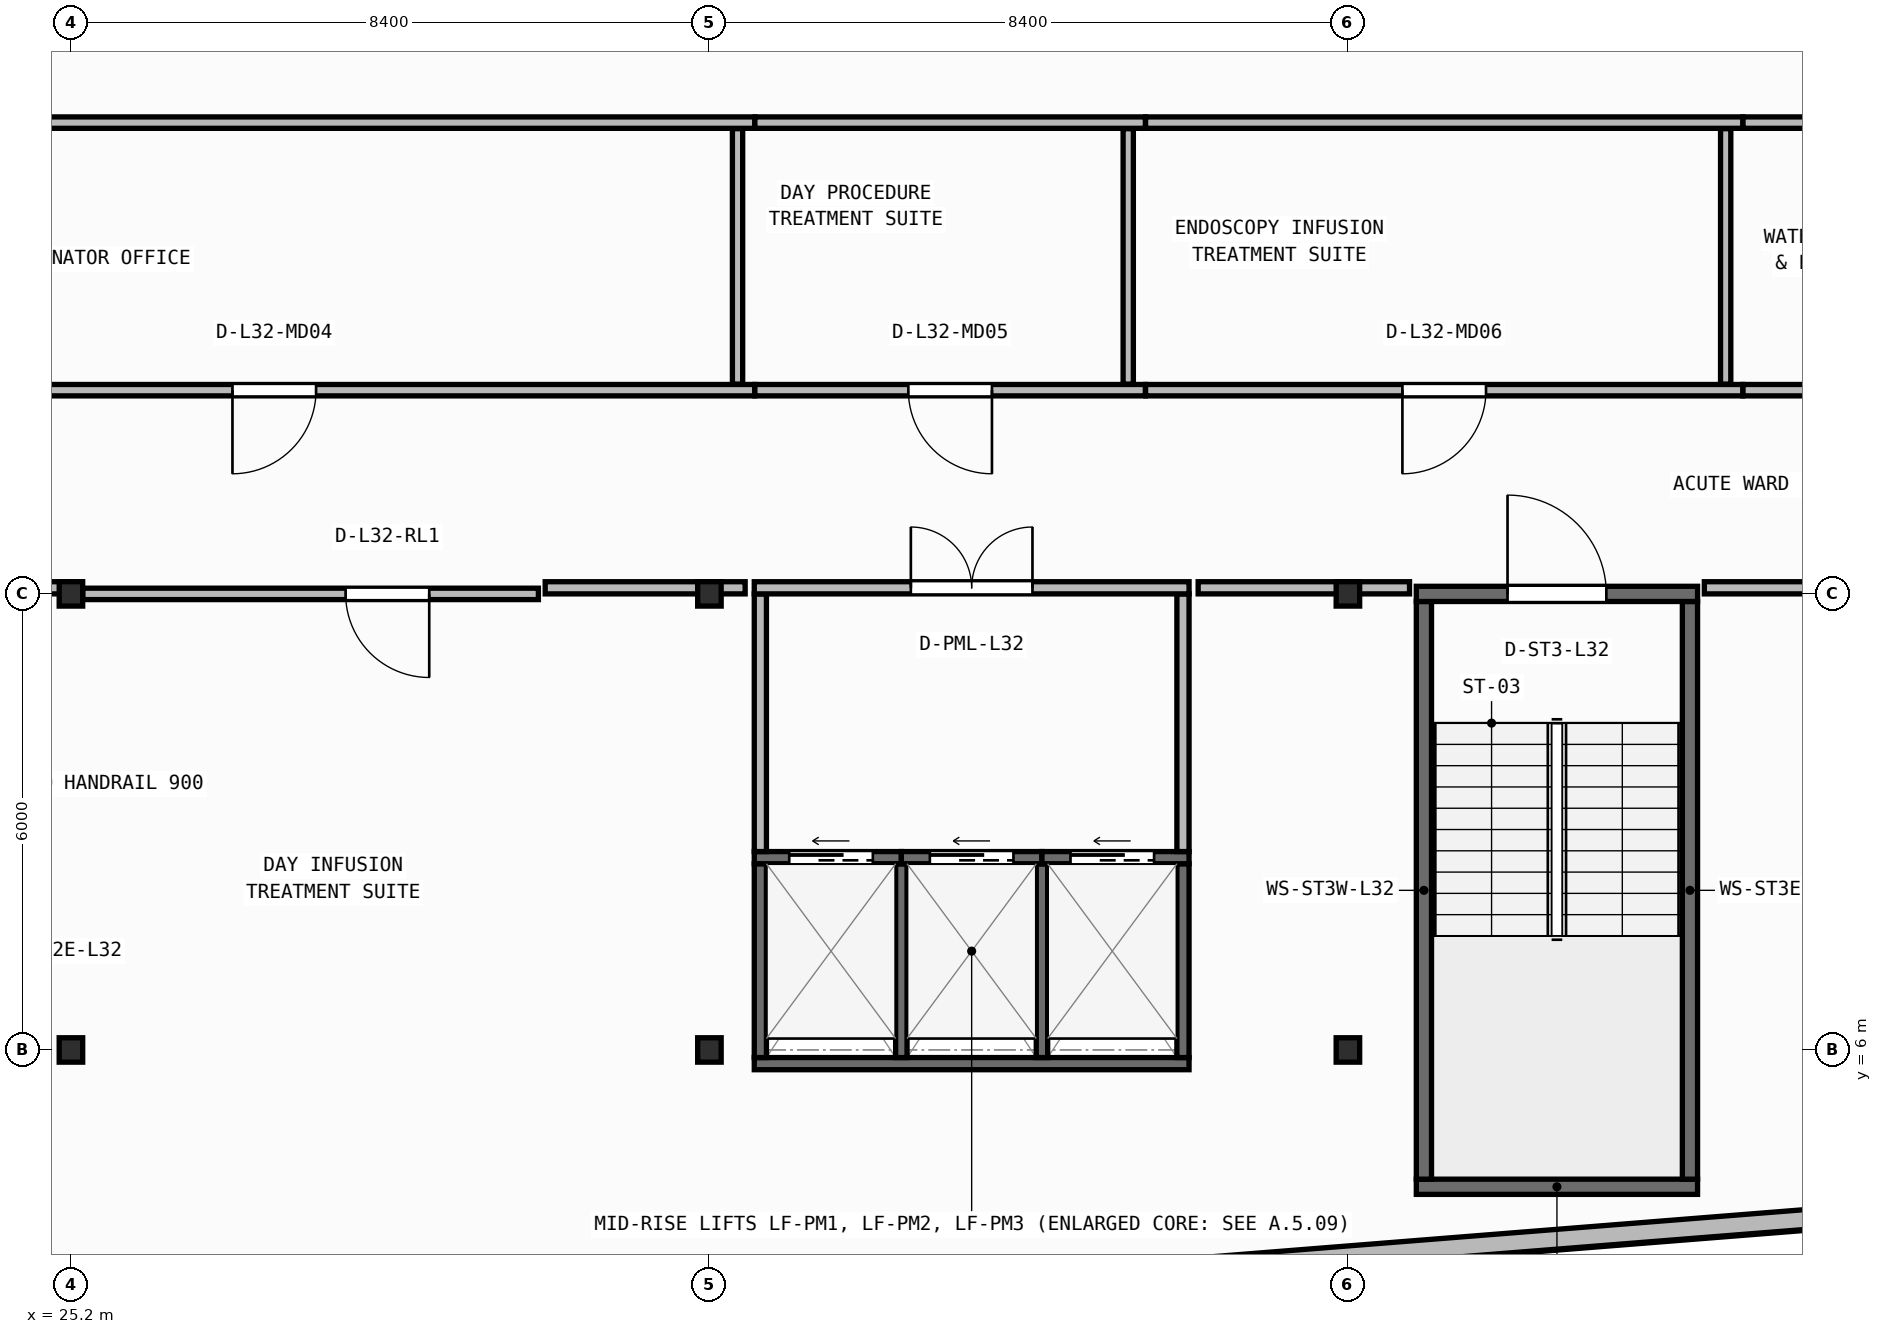
"""IFC4 building model, lengths in metres.
Left out: names, types, materials, properties, quantities, classifications, styles, units other than length and angle.
Written with IfcOpenShell. Run it as: python <this file> out.ifc"""

import sys

from ifc_helpers import new_model, si_unit, direction, frame, frame_2d, origin, origin_2d, place, context, subcontext, project, spatial, rectangle, i_section, extrude, element, fill, save


model = new_model("IFC4")
c1 = context("Model", 3, precision=1e-05, world=origin(), true_north=direction((0.0, 1.0)))
c2 = subcontext(c1, "Body", "Model", "MODEL_VIEW")
j1 = project(units=[si_unit("LENGTHUNIT", "METRE"), si_unit("PLANEANGLEUNIT", "RADIAN")], contexts=[c1])
p1 = place(None, origin())
s1 = spatial("IfcSite", under=j1, at=p1, CompositionType="ELEMENT")
p2 = place(p1, origin())
s2 = spatial("IfcBuilding", under=s1, at=p2, CompositionType="ELEMENT")
p3 = place(p2, frame((0.0, 0.0, 131.0)))
s3 = spatial("IfcBuildingStorey", under=s2, at=p3, CompositionType="ELEMENT", Elevation=131.0)
for number, where, z_axis, x_axis in (
    (1, (25.2, 6.0, 0.0), (0.0, 0.0, 1.0), (1.0, 0.0, 0.0)),
    (2, (33.6, 6.0, 0.0), (0.0, 0.0, 1.0), (1.0, 0.0, 0.0)),
    (3, (42.0, 6.0, 0.0), (0.0, 0.0, 1.0), (1.0, 0.0, 0.0)),
    (4, (25.2, 12.0, 0.0), (0.0, 0.0, 1.0), (1.0, 0.0, 0.0)),
    (5, (33.6, 12.0, 0.0), (0.0, 0.0, 1.0), (1.0, 0.0, 0.0)),
    (6, (42.0, 12.0, 0.0), (0.0, 0.0, 1.0), (1.0, 0.0, 0.0)),
):
    element("IfcColumn", number, at=place(p3, frame(where, z_axis=z_axis, x_axis=x_axis)), inside=s3, PredefinedType="COLUMN", context=c2, shape_type="SweptSolid", body=[
        extrude(i_section(OverallWidth=0.309, OverallDepth=0.321, WebThickness=0.014, FlangeThickness=0.022, FilletRadius=0.017, at=origin_2d()), origin(), (0.0, 0.0, 1.0), 3.95),
    ])
p4 = place(p3, frame((2.76, 0.173, 0.0), z_axis=(0.0, 0.0, 1.0), x_axis=(0.996857931723, 0.079210251617, 0.0)))
e7 = element("IfcWall", 7, at=p4, inside=s3, PredefinedType="STANDARD", context=c2, shape_type="SweptSolid", body=[
    extrude(rectangle(XDim=51.442, YDim=0.26, at=frame_2d((25.721, 0.0))), origin(), (0.0, 0.0, 1.0), 3.71),
])
p5 = place(p4, frame((24.521, 0.0, 0.9)))
e8 = element("IfcOpeningElement", 8, at=p5, cuts=e7, PredefinedType="OPENING", context=c2, shape_type="SweptSolid", body=[
    extrude(rectangle(XDim=2.4, YDim=1.65, at=frame_2d((1.2, 0.825))), frame((0.0, 0.14, 0.0), z_axis=(0.0, -1.0, 0.0), x_axis=(1.0, 0.0, 0.0)), (0.0, 0.0, 1.0), 0.28),
])
p6 = place(p3, frame((42.9, 4.2, 0.0), z_axis=(0.0, 0.0, 1.0), x_axis=(1.0, 0.0, 0.0)))
e9 = element("IfcWall", 9, at=p6, inside=s3, PredefinedType="SHEAR", context=c2, shape_type="SweptSolid", body=[
    extrude(rectangle(XDim=3.7, YDim=0.2, at=frame_2d((1.85, 0.0))), origin(), (0.0, 0.0, 1.0), 3.71),
])
for number, where, z_axis, x_axis in (
    (10, (43.0, 4.3, 0.0), (0.0, 0.0, 1.0), (0.0, 1.0, 0.0)),
    (11, (46.5, 4.3, 0.0), (0.0, 0.0, 1.0), (0.0, 1.0, 0.0)),
):
    element("IfcWall", number, at=place(p3, frame(where, z_axis=z_axis, x_axis=x_axis)), inside=s3, PredefinedType="SHEAR", context=c2, shape_type="SweptSolid", body=[
        extrude(rectangle(XDim=7.6, YDim=0.2, at=frame_2d((3.8, 0.0))), origin(), (0.0, 0.0, 1.0), 3.71),
    ])
p7 = place(p3, frame((42.9, 12.0, 0.0), z_axis=(0.0, 0.0, 1.0), x_axis=(1.0, 0.0, 0.0)))
e12 = element("IfcWall", 12, at=p7, inside=s3, PredefinedType="SHEAR", context=c2, shape_type="SweptSolid", body=[
    extrude(rectangle(XDim=3.7, YDim=0.2, at=frame_2d((1.85, 0.0))), origin(), (0.0, 0.0, 1.0), 3.71),
])
p8 = place(p7, frame((1.2, 0.0, 0.0)))
e13 = element("IfcOpeningElement", 13, at=p8, cuts=e12, PredefinedType="OPENING", context=c2, shape_type="SweptSolid", body=[
    extrude(rectangle(XDim=1.3, YDim=2.15, at=frame_2d((0.65, 1.075))), frame((0.0, 0.11, 0.0), z_axis=(0.0, -1.0, 0.0), x_axis=(1.0, 0.0, 0.0)), (0.0, 0.0, 1.0), 0.22),
])
p9 = place(p3, frame((34.19, 5.82, 0.0), z_axis=(0.0, 0.0, 1.0), x_axis=(1.0, 0.0, 0.0)))
e14 = element("IfcWall", 14, at=p9, inside=s3, PredefinedType="SHEAR", context=c2, shape_type="SweptSolid", body=[
    extrude(rectangle(XDim=5.72, YDim=0.16, at=frame_2d((2.86, 0.0))), origin(), (0.0, 0.0, 1.0), 3.71),
])
for number, where, z_axis, x_axis in (
    (15, (34.27, 5.9, 0.0), (0.0, 0.0, 1.0), (0.0, 1.0, 0.0)),
    (16, (39.83, 5.9, 0.0), (0.0, 0.0, 1.0), (0.0, 1.0, 0.0)),
):
    element("IfcWall", number, at=place(p3, frame(where, z_axis=z_axis, x_axis=x_axis)), inside=s3, PredefinedType="SHEAR", context=c2, shape_type="SweptSolid", body=[
        extrude(rectangle(XDim=2.55, YDim=0.16, at=frame_2d((1.275, 0.0))), origin(), (0.0, 0.0, 1.0), 3.71),
    ])
for number, where, z_axis, x_axis in (
    (17, (36.125, 5.9, 0.0), (0.0, 0.0, 1.0), (0.0, 1.0, 0.0)),
    (18, (37.975, 5.9, 0.0), (0.0, 0.0, 1.0), (0.0, 1.0, 0.0)),
):
    element("IfcWall", number, at=place(p3, frame(where, z_axis=z_axis, x_axis=x_axis)), inside=s3, PredefinedType="SHEAR", context=c2, shape_type="SweptSolid", body=[
        extrude(rectangle(XDim=2.55, YDim=0.15, at=frame_2d((1.275, 0.0))), origin(), (0.0, 0.0, 1.0), 3.71),
    ])
p10 = place(p3, frame((34.19, 8.53, 0.0), z_axis=(0.0, 0.0, 1.0), x_axis=(1.0, 0.0, 0.0)))
e19 = element("IfcWall", 19, at=p10, inside=s3, PredefinedType="SHEAR", context=c2, shape_type="SweptSolid", body=[
    extrude(rectangle(XDim=1.935, YDim=0.16, at=frame_2d((0.968, 0.0))), origin(), (0.0, 0.0, 1.0), 3.71),
])
p11 = place(p10, frame((0.46, 0.0, 0.0)))
e20 = element("IfcOpeningElement", 20, at=p11, cuts=e19, PredefinedType="OPENING", context=c2, shape_type="SweptSolid", body=[
    extrude(rectangle(XDim=1.1, YDim=2.15, at=frame_2d((0.55, 1.075))), frame((0.0, 0.09, 0.0), z_axis=(0.0, -1.0, 0.0), x_axis=(1.0, 0.0, 0.0)), (0.0, 0.0, 1.0), 0.18),
])
p12 = place(p3, frame((36.125, 8.53, 0.0), z_axis=(0.0, 0.0, 1.0), x_axis=(1.0, 0.0, 0.0)))
e21 = element("IfcWall", 21, at=p12, inside=s3, PredefinedType="SHEAR", context=c2, shape_type="SweptSolid", body=[
    extrude(rectangle(XDim=1.85, YDim=0.16, at=frame_2d((0.925, 0.0))), origin(), (0.0, 0.0, 1.0), 3.71),
])
p13 = place(p12, frame((0.375, 0.0, 0.0)))
e22 = element("IfcOpeningElement", 22, at=p13, cuts=e21, PredefinedType="OPENING", context=c2, shape_type="SweptSolid", body=[
    extrude(rectangle(XDim=1.1, YDim=2.15, at=frame_2d((0.55, 1.075))), frame((0.0, 0.09, 0.0), z_axis=(0.0, -1.0, 0.0), x_axis=(1.0, 0.0, 0.0)), (0.0, 0.0, 1.0), 0.18),
])
p14 = place(p3, frame((37.975, 8.53, 0.0), z_axis=(0.0, 0.0, 1.0), x_axis=(1.0, 0.0, 0.0)))
e23 = element("IfcWall", 23, at=p14, inside=s3, PredefinedType="SHEAR", context=c2, shape_type="SweptSolid", body=[
    extrude(rectangle(XDim=1.935, YDim=0.16, at=frame_2d((0.967, 0.0))), origin(), (0.0, 0.0, 1.0), 3.71),
])
p15 = place(p14, frame((0.375, 0.0, 0.0)))
e24 = element("IfcOpeningElement", 24, at=p15, cuts=e23, PredefinedType="OPENING", context=c2, shape_type="SweptSolid", body=[
    extrude(rectangle(XDim=1.1, YDim=2.15, at=frame_2d((0.55, 1.075))), frame((0.0, 0.09, 0.0), z_axis=(0.0, -1.0, 0.0), x_axis=(1.0, 0.0, 0.0)), (0.0, 0.0, 1.0), 0.18),
])
for number, where, z_axis, x_axis in (
    (25, (34.27, 8.61, 0.0), (0.0, 0.0, 1.0), (0.0, 1.0, 0.0)),
    (26, (39.83, 8.61, 0.0), (0.0, 0.0, 1.0), (0.0, 1.0, 0.0)),
):
    element("IfcWall", number, at=place(p3, frame(where, z_axis=z_axis, x_axis=x_axis)), inside=s3, PredefinedType="PARTITIONING", context=c2, shape_type="SweptSolid", body=[
        extrude(rectangle(XDim=3.39, YDim=0.16, at=frame_2d((1.695, 0.0))), origin(), (0.0, 0.0, 1.0), 3.71),
    ])
p16 = place(p3, frame((34.19, 12.08, 0.0), z_axis=(0.0, 0.0, 1.0), x_axis=(1.0, 0.0, 0.0)))
e27 = element("IfcWall", 27, at=p16, inside=s3, PredefinedType="PARTITIONING", context=c2, shape_type="SweptSolid", body=[
    extrude(rectangle(XDim=5.72, YDim=0.16, at=frame_2d((2.86, 0.0))), origin(), (0.0, 0.0, 1.0), 3.083),
])
p17 = place(p16, frame((2.06, 0.0, 0.0)))
e28 = element("IfcOpeningElement", 28, at=p17, cuts=e27, PredefinedType="OPENING", context=c2, shape_type="SweptSolid", body=[
    extrude(rectangle(XDim=1.6, YDim=2.05, at=frame_2d((0.8, 1.025))), frame((0.0, 0.09, 0.0), z_axis=(0.0, -1.0, 0.0), x_axis=(1.0, 0.0, 0.0)), (0.0, 0.0, 1.0), 0.18),
])
p18 = place(p3, frame((31.35, 12.0, 0.0), z_axis=(0.0, 0.0, 1.0), x_axis=(-1.0, 0.0, 0.0)))
e29 = element("IfcWall", 29, at=p18, inside=s3, PredefinedType="PARTITIONING", context=c2, shape_type="SweptSolid", body=[
    extrude(rectangle(XDim=5.996, YDim=0.15, at=frame_2d((2.998, 0.0))), origin(), (0.0, 0.0, 1.0), 3.083),
])
p19 = place(p18, frame((1.436, 0.0, 0.0)))
e30 = element("IfcOpeningElement", 30, at=p19, cuts=e29, PredefinedType="OPENING", context=c2, shape_type="SweptSolid", body=[
    extrude(rectangle(XDim=1.1, YDim=2.1, at=frame_2d((0.55, 1.05))), frame((0.0, 0.085, 0.0), z_axis=(0.0, -1.0, 0.0), x_axis=(1.0, 0.0, 0.0)), (0.0, 0.0, 1.0), 0.17),
])
p20 = place(p3, frame((34.196, 14.68, 0.0), z_axis=(0.0, 0.0, 1.0), x_axis=(-1.0, 0.0, 0.0)))
e31 = element("IfcWall", 31, at=p20, inside=s3, PredefinedType="PARTITIONING", context=c2, shape_type="SweptSolid", body=[
    extrude(rectangle(XDim=12.642, YDim=0.15, at=frame_2d((6.321, 0.0))), origin(), (0.0, 0.0, 1.0), 3.71),
])
p21 = place(p20, frame((5.771, 0.0, 0.0)))
e32 = element("IfcOpeningElement", 32, at=p21, cuts=e31, PredefinedType="OPENING", context=c2, shape_type="SweptSolid", body=[
    extrude(rectangle(XDim=1.1, YDim=2.1, at=frame_2d((0.55, 1.05))), frame((0.0, 0.085, 0.0), z_axis=(0.0, -1.0, 0.0), x_axis=(1.0, 0.0, 0.0)), (0.0, 0.0, 1.0), 0.17),
])
p22 = place(p3, frame((39.336, 14.68, 0.0), z_axis=(0.0, 0.0, 1.0), x_axis=(-1.0, 0.0, 0.0)))
e33 = element("IfcWall", 33, at=p22, inside=s3, PredefinedType="PARTITIONING", context=c2, shape_type="SweptSolid", body=[
    extrude(rectangle(XDim=5.138, YDim=0.15, at=frame_2d((2.569, 0.0))), origin(), (0.0, 0.0, 1.0), 3.71),
])
p23 = place(p22, frame((2.019, 0.0, 0.0)))
e34 = element("IfcOpeningElement", 34, at=p23, cuts=e33, PredefinedType="OPENING", context=c2, shape_type="SweptSolid", body=[
    extrude(rectangle(XDim=1.1, YDim=2.1, at=frame_2d((0.55, 1.05))), frame((0.0, 0.085, 0.0), z_axis=(0.0, -1.0, 0.0), x_axis=(1.0, 0.0, 0.0)), (0.0, 0.0, 1.0), 0.17),
])
p24 = place(p3, frame((47.196, 14.68, 0.0), z_axis=(0.0, 0.0, 1.0), x_axis=(-1.0, 0.0, 0.0)))
e35 = element("IfcWall", 35, at=p24, inside=s3, PredefinedType="PARTITIONING", context=c2, shape_type="SweptSolid", body=[
    extrude(rectangle(XDim=7.858, YDim=0.15, at=frame_2d((3.929, 0.0))), origin(), (0.0, 0.0, 1.0), 3.71),
])
p25 = place(p24, frame((3.379, 0.0, 0.0)))
e36 = element("IfcOpeningElement", 36, at=p25, cuts=e35, PredefinedType="OPENING", context=c2, shape_type="SweptSolid", body=[
    extrude(rectangle(XDim=1.1, YDim=2.1, at=frame_2d((0.55, 1.05))), frame((0.0, 0.085, 0.0), z_axis=(0.0, -1.0, 0.0), x_axis=(1.0, 0.0, 0.0)), (0.0, 0.0, 1.0), 0.17),
])
p26 = place(p3, frame((56.52, 14.68, 0.0), z_axis=(0.0, 0.0, 1.0), x_axis=(-1.0, 0.0, 0.0)))
e37 = element("IfcWall", 37, at=p26, inside=s3, PredefinedType="PARTITIONING", context=c2, shape_type="SweptSolid", body=[
    extrude(rectangle(XDim=9.322, YDim=0.15, at=frame_2d((4.661, 0.0))), origin(), (0.0, 0.0, 1.0), 3.71),
])
p27 = place(p26, frame((4.111, 0.0, 0.0)))
e38 = element("IfcOpeningElement", 38, at=p27, cuts=e37, PredefinedType="OPENING", context=c2, shape_type="SweptSolid", body=[
    extrude(rectangle(XDim=1.1, YDim=2.1, at=frame_2d((0.55, 1.05))), frame((0.0, 0.085, 0.0), z_axis=(0.0, -1.0, 0.0), x_axis=(1.0, 0.0, 0.0)), (0.0, 0.0, 1.0), 0.17),
])
p28 = place(p3, frame((21.72, 18.2, 0.0), z_axis=(0.0, 0.0, 1.0), x_axis=(1.0, 0.0, 0.0)))
e39 = element("IfcWall", 39, at=p28, inside=s3, PredefinedType="PARTITIONING", context=c2, shape_type="SweptSolid", body=[
    extrude(rectangle(XDim=12.476, YDim=0.15, at=frame_2d((6.238, 0.0))), origin(), (0.0, 0.0, 1.0), 3.71),
])
p29 = place(p3, frame((34.198, 18.2, 0.0), z_axis=(0.0, 0.0, 1.0), x_axis=(1.0, 0.0, 0.0)))
e40 = element("IfcWall", 40, at=p29, inside=s3, PredefinedType="PARTITIONING", context=c2, shape_type="SweptSolid", body=[
    extrude(rectangle(XDim=5.138, YDim=0.15, at=frame_2d((2.569, 0.0))), origin(), (0.0, 0.0, 1.0), 3.71),
])
p30 = place(p3, frame((39.338, 18.2, 0.0), z_axis=(0.0, 0.0, 1.0), x_axis=(1.0, 0.0, 0.0)))
e41 = element("IfcWall", 41, at=p30, inside=s3, PredefinedType="PARTITIONING", context=c2, shape_type="SweptSolid", body=[
    extrude(rectangle(XDim=7.858, YDim=0.15, at=frame_2d((3.929, 0.0))), origin(), (0.0, 0.0, 1.0), 3.71),
])
p31 = place(p3, frame((47.198, 18.2, 0.0), z_axis=(0.0, 0.0, 1.0), x_axis=(1.0, 0.0, 0.0)))
e42 = element("IfcWall", 42, at=p31, inside=s3, PredefinedType="PARTITIONING", context=c2, shape_type="SweptSolid", body=[
    extrude(rectangle(XDim=9.322, YDim=0.15, at=frame_2d((4.661, 0.0))), origin(), (0.0, 0.0, 1.0), 3.71),
])
p32 = place(p3, frame((33.97, 14.76, 0.0), z_axis=(0.0, 0.0, 1.0), x_axis=(0.0, 1.0, 0.0)))
e43 = element("IfcWall", 43, at=p32, inside=s3, PredefinedType="PARTITIONING", context=c2, shape_type="SweptSolid", body=[
    extrude(rectangle(XDim=3.36, YDim=0.135, at=frame_2d((1.68, 0.0))), origin(), (0.0, 0.0, 1.0), 3.152),
])
for number, where, z_axis, x_axis in (
    (44, (39.11, 14.76, 0.0), (0.0, 0.0, 1.0), (0.0, 1.0, 0.0)),
    (45, (46.97, 14.76, 0.0), (0.0, 0.0, 1.0), (0.0, 1.0, 0.0)),
):
    element("IfcWall", number, at=place(p3, frame(where, z_axis=z_axis, x_axis=x_axis)), inside=s3, PredefinedType="PARTITIONING", context=c2, shape_type="SweptSolid", body=[
        extrude(rectangle(XDim=3.36, YDim=0.135, at=frame_2d((1.68, 0.0))), origin(), (0.0, 0.0, 1.0), 3.71),
    ])
p33 = place(p3, frame((24.02, 12.08, 0.0), z_axis=(0.0, 0.0, 1.0), x_axis=(1.0, 0.0, 0.0)))
e46 = element("IfcWall", 46, at=p33, inside=s3, PredefinedType="PARTITIONING", context=c2, shape_type="SweptSolid", body=[
    extrude(rectangle(XDim=1.245, YDim=0.16, at=frame_2d((0.623, 0.0))), origin(), (0.0, 0.0, 1.0), 3.083),
])
p34 = place(p3, frame((31.439, 12.08, 0.0), z_axis=(0.0, 0.0, 1.0), x_axis=(1.0, 0.0, 0.0)))
e47 = element("IfcWall", 47, at=p34, inside=s3, PredefinedType="PARTITIONING", context=c2, shape_type="SweptSolid", body=[
    extrude(rectangle(XDim=2.631, YDim=0.16, at=frame_2d((1.315, 0.0))), origin(), (0.0, 0.0, 1.0), 3.083),
])
p35 = place(p3, frame((40.03, 12.08, 0.0), z_axis=(0.0, 0.0, 1.0), x_axis=(1.0, 0.0, 0.0)))
e48 = element("IfcWall", 48, at=p35, inside=s3, PredefinedType="PARTITIONING", context=c2, shape_type="SweptSolid", body=[
    extrude(rectangle(XDim=2.781, YDim=0.16, at=frame_2d((1.39, 0.0))), origin(), (0.0, 0.0, 1.0), 3.083),
])
p36 = place(p3, frame((46.689, 12.08, 0.0), z_axis=(0.0, 0.0, 1.0), x_axis=(1.0, 0.0, 0.0)))
e49 = element("IfcWall", 49, at=p36, inside=s3, PredefinedType="PARTITIONING", context=c2, shape_type="SweptSolid", body=[
    extrude(rectangle(XDim=3.011, YDim=0.16, at=frame_2d((1.505, 0.0))), origin(), (0.0, 0.0, 1.0), 3.083),
])
p37 = place(p8, origin())
e50 = element("IfcDoor", 50, at=p37, inside=s3, OperationType="SINGLE_SWING_LEFT", PredefinedType="DOOR", context=c2, shape_type="SweptSolid", body=[
    extrude(rectangle(XDim=1.3, YDim=2.15, at=frame_2d((0.65, 1.075))), frame((0.0, 0.025, 0.0), z_axis=(0.0, -1.0, 0.0), x_axis=(1.0, 0.0, 0.0)), (0.0, 0.0, 1.0), 0.05),
])
fill(e13, e50)
p38 = place(p11, origin())
e51 = element("IfcDoor", 51, at=p38, inside=s3, OperationType="SLIDING_TO_LEFT", PredefinedType="DOOR", context=c2, shape_type="SweptSolid", body=[
    extrude(rectangle(XDim=1.1, YDim=2.15, at=frame_2d((0.55, 1.075))), frame((0.0, 0.025, 0.0), z_axis=(0.0, -1.0, 0.0), x_axis=(1.0, 0.0, 0.0)), (0.0, 0.0, 1.0), 0.05),
])
fill(e20, e51)
p39 = place(p13, origin())
e52 = element("IfcDoor", 52, at=p39, inside=s3, OperationType="SLIDING_TO_LEFT", PredefinedType="DOOR", context=c2, shape_type="SweptSolid", body=[
    extrude(rectangle(XDim=1.1, YDim=2.15, at=frame_2d((0.55, 1.075))), frame((0.0, 0.025, 0.0), z_axis=(0.0, -1.0, 0.0), x_axis=(1.0, 0.0, 0.0)), (0.0, 0.0, 1.0), 0.05),
])
fill(e22, e52)
p40 = place(p15, origin())
e53 = element("IfcDoor", 53, at=p40, inside=s3, OperationType="SLIDING_TO_LEFT", PredefinedType="DOOR", context=c2, shape_type="SweptSolid", body=[
    extrude(rectangle(XDim=1.1, YDim=2.15, at=frame_2d((0.55, 1.075))), frame((0.0, 0.025, 0.0), z_axis=(0.0, -1.0, 0.0), x_axis=(1.0, 0.0, 0.0)), (0.0, 0.0, 1.0), 0.05),
])
fill(e24, e53)
p41 = place(p17, origin())
e54 = element("IfcDoor", 54, at=p41, inside=s3, OperationType="DOUBLE_DOOR_SINGLE_SWING", PredefinedType="DOOR", context=c2, shape_type="SweptSolid", body=[
    extrude(rectangle(XDim=1.6, YDim=2.05, at=frame_2d((0.8, 1.025))), frame((0.0, 0.025, 0.0), z_axis=(0.0, -1.0, 0.0), x_axis=(1.0, 0.0, 0.0)), (0.0, 0.0, 1.0), 0.05),
])
fill(e28, e54)
p42 = place(p19, origin())
e55 = element("IfcDoor", 55, at=p42, inside=s3, OperationType="SINGLE_SWING_LEFT", PredefinedType="DOOR", context=c2, shape_type="SweptSolid", body=[
    extrude(rectangle(XDim=1.1, YDim=2.1, at=frame_2d((0.55, 1.05))), frame((0.0, 0.025, 0.0), z_axis=(0.0, -1.0, 0.0), x_axis=(1.0, 0.0, 0.0)), (0.0, 0.0, 1.0), 0.05),
])
fill(e30, e55)
p43 = place(p21, origin())
e56 = element("IfcDoor", 56, at=p43, inside=s3, OperationType="SINGLE_SWING_RIGHT", PredefinedType="DOOR", context=c2, shape_type="SweptSolid", body=[
    extrude(rectangle(XDim=1.1, YDim=2.1, at=frame_2d((0.55, 1.05))), frame((0.0, 0.025, 0.0), z_axis=(0.0, -1.0, 0.0), x_axis=(1.0, 0.0, 0.0)), (0.0, 0.0, 1.0), 0.05),
])
fill(e32, e56)
p44 = place(p23, origin())
e57 = element("IfcDoor", 57, at=p44, inside=s3, OperationType="SINGLE_SWING_LEFT", PredefinedType="DOOR", context=c2, shape_type="SweptSolid", body=[
    extrude(rectangle(XDim=1.1, YDim=2.1, at=frame_2d((0.55, 1.05))), frame((0.0, 0.025, 0.0), z_axis=(0.0, -1.0, 0.0), x_axis=(1.0, 0.0, 0.0)), (0.0, 0.0, 1.0), 0.05),
])
fill(e34, e57)
p45 = place(p25, origin())
e58 = element("IfcDoor", 58, at=p45, inside=s3, OperationType="SINGLE_SWING_RIGHT", PredefinedType="DOOR", context=c2, shape_type="SweptSolid", body=[
    extrude(rectangle(XDim=1.1, YDim=2.1, at=frame_2d((0.55, 1.05))), frame((0.0, 0.025, 0.0), z_axis=(0.0, -1.0, 0.0), x_axis=(1.0, 0.0, 0.0)), (0.0, 0.0, 1.0), 0.05),
])
fill(e36, e58)
save(model, sys.argv[1])
